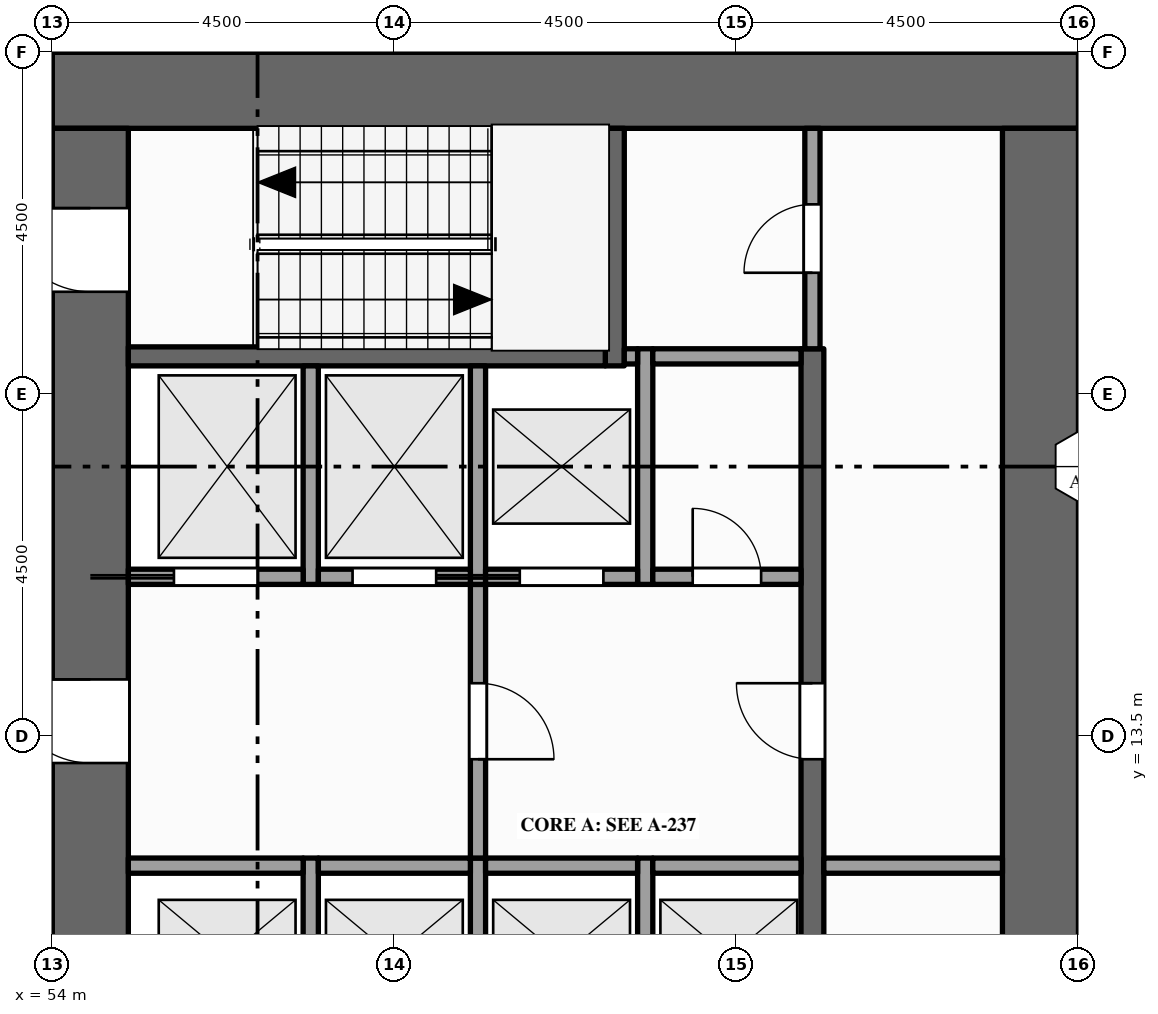
"""IFC4 building model, lengths in metres.
Left out: names, types, materials, properties, quantities, classifications, styles, units other than length and angle.
Written with IfcOpenShell. Run it as: python <this file> out.ifc"""

import sys

from ifc_helpers import new_model, si_unit, direction, frame, frame_2d, origin, place, context, subcontext, project, spatial, rectangle, extrude, element, fill, save


model = new_model("IFC4")
c1 = context("Model", 3, precision=1e-05, world=origin(), true_north=direction((0.0, 1.0)))
c2 = subcontext(c1, "Body", "Model", "MODEL_VIEW")
j1 = project(units=[si_unit("LENGTHUNIT", "METRE"), si_unit("PLANEANGLEUNIT", "RADIAN")], contexts=[c1])
p1 = place(None, origin())
s1 = spatial("IfcSite", under=j1, at=p1, CompositionType="ELEMENT")
p2 = place(p1, origin())
s2 = spatial("IfcBuilding", under=s1, at=p2, CompositionType="ELEMENT")
p3 = place(p2, frame((0.0, 0.0, 207.0)))
s3 = spatial("IfcBuildingStorey", under=s2, at=p3, CompositionType="ELEMENT", Elevation=207.0)
p4 = place(p3, frame((54.0, 22.0, -0.15), z_axis=(0.0, 0.0, 1.0), x_axis=(1.0, 0.0, 0.0)))
e1 = element("IfcWall", 1, at=p4, inside=s3, PredefinedType="SHEAR", context=c2, shape_type="SweptSolid", body=[
    extrude(rectangle(XDim=13.5, YDim=1.0, at=frame_2d((6.75, 0.0))), origin(), (0.0, 0.0, 1.0), 4.0),
])
p5 = place(p3, frame((54.5, 1.0, -0.15), z_axis=(0.0, 0.0, 1.0), x_axis=(0.0, 1.0, 0.0)))
e2 = element("IfcWall", 2, at=p5, inside=s3, PredefinedType="SHEAR", context=c2, shape_type="SweptSolid", body=[
    extrude(rectangle(XDim=20.5, YDim=1.0, at=frame_2d((10.25, 0.0))), origin(), (0.0, 0.0, 1.0), 4.0),
])
p6 = place(p5, frame((6.1, 0.0, 0.15)))
e3 = element("IfcOpeningElement", 3, at=p6, cuts=e2, PredefinedType="OPENING", context=c2, shape_type="SweptSolid", body=[
    extrude(rectangle(XDim=1.8, YDim=2.1, at=frame_2d((0.9, 1.05))), frame((0.0, 0.51, 0.0), z_axis=(0.0, -1.0, 0.0), x_axis=(1.0, 0.0, 0.0)), (0.0, 0.0, 1.0), 1.02),
])
p7 = place(p5, frame((12.15, 0.0, 0.15)))
e4 = element("IfcOpeningElement", 4, at=p7, cuts=e2, PredefinedType="OPENING", context=c2, shape_type="SweptSolid", body=[
    extrude(rectangle(XDim=1.1, YDim=2.1, at=frame_2d((0.55, 1.05))), frame((0.0, 0.51, 0.0), z_axis=(0.0, -1.0, 0.0), x_axis=(1.0, 0.0, 0.0)), (0.0, 0.0, 1.0), 1.02),
])
p8 = place(p5, frame((1.15, 0.0, 0.15)))
e5 = element("IfcOpeningElement", 5, at=p8, cuts=e2, PredefinedType="OPENING", context=c2, shape_type="SweptSolid", body=[
    extrude(rectangle(XDim=1.1, YDim=2.1, at=frame_2d((0.55, 1.05))), frame((0.0, 0.51, 0.0), z_axis=(0.0, -1.0, 0.0), x_axis=(1.0, 0.0, 0.0)), (0.0, 0.0, 1.0), 1.02),
])
p9 = place(p5, frame((18.35, 0.0, 0.15)))
e6 = element("IfcOpeningElement", 6, at=p9, cuts=e2, PredefinedType="OPENING", context=c2, shape_type="SweptSolid", body=[
    extrude(rectangle(XDim=1.1, YDim=2.1, at=frame_2d((0.55, 1.05))), frame((0.0, 0.51, 0.0), z_axis=(0.0, -1.0, 0.0), x_axis=(1.0, 0.0, 0.0)), (0.0, 0.0, 1.0), 1.02),
])
p10 = place(p3, frame((67.0, 1.0, -0.15), z_axis=(0.0, 0.0, 1.0), x_axis=(0.0, 1.0, 0.0)))
e7 = element("IfcWall", 7, at=p10, inside=s3, PredefinedType="SHEAR", context=c2, shape_type="SweptSolid", body=[
    extrude(rectangle(XDim=20.5, YDim=1.0, at=frame_2d((10.25, 0.0))), origin(), (0.0, 0.0, 1.0), 4.0),
])
p11 = place(p3, frame((57.4, 9.3, 0.0), z_axis=(0.0, 0.0, 1.0), x_axis=(0.0, 1.0, 0.0)))
e8 = element("IfcWall", 8, at=p11, inside=s3, PredefinedType="SOLIDWALL", context=c2, shape_type="SweptSolid", body=[
    extrude(rectangle(XDim=2.6, YDim=0.2, at=frame_2d((1.3, 0.0))), origin(), (0.0, 0.0, 1.0), 3.85),
])
p12 = place(p3, frame((57.4, 15.5, 0.0), z_axis=(0.0, 0.0, 1.0), x_axis=(0.0, 1.0, 0.0)))
e9 = element("IfcWall", 9, at=p12, inside=s3, PredefinedType="SOLIDWALL", context=c2, shape_type="SweptSolid", body=[
    extrude(rectangle(XDim=2.875, YDim=0.2, at=frame_2d((1.438, 0.0))), origin(), (0.0, 0.0, 1.0), 3.85),
])
p13 = place(p3, frame((59.6, 9.3, 0.0), z_axis=(0.0, 0.0, 1.0), x_axis=(0.0, 1.0, 0.0)))
e10 = element("IfcWall", 10, at=p13, inside=s3, PredefinedType="SOLIDWALL", context=c2, shape_type="SweptSolid", body=[
    extrude(rectangle(XDim=2.6, YDim=0.2, at=frame_2d((1.3, 0.0))), origin(), (0.0, 0.0, 1.0), 3.85),
])
p14 = place(p3, frame((59.6, 11.9, 0.0), z_axis=(0.0, 0.0, 1.0), x_axis=(0.0, 1.0, 0.0)))
e11 = element("IfcWall", 11, at=p14, inside=s3, PredefinedType="PARTITIONING", context=c2, shape_type="SweptSolid", body=[
    extrude(rectangle(XDim=3.6, YDim=0.2, at=frame_2d((1.8, 0.0))), origin(), (0.0, 0.0, 1.0), 3.85),
])
p15 = place(p14, frame((1.3, 0.0, 0.0)))
e12 = element("IfcOpeningElement", 12, at=p15, cuts=e11, PredefinedType="OPENING", context=c2, shape_type="SweptSolid", body=[
    extrude(rectangle(XDim=1.0, YDim=2.1, at=frame_2d((0.5, 1.05))), frame((0.0, 0.11, 0.0), z_axis=(0.0, -1.0, 0.0), x_axis=(1.0, 0.0, 0.0)), (0.0, 0.0, 1.0), 0.22),
])
p16 = place(p3, frame((59.6, 15.5, 0.0), z_axis=(0.0, 0.0, 1.0), x_axis=(0.0, 1.0, 0.0)))
e13 = element("IfcWall", 13, at=p16, inside=s3, PredefinedType="SOLIDWALL", context=c2, shape_type="SweptSolid", body=[
    extrude(rectangle(XDim=2.875, YDim=0.2, at=frame_2d((1.438, 0.0))), origin(), (0.0, 0.0, 1.0), 3.85),
])
p17 = place(p3, frame((61.4, 18.375, 0.0), z_axis=(0.0, 0.0, 1.0), x_axis=(0.0, 1.0, 0.0)))
e14 = element("IfcWall", 14, at=p17, inside=s3, PredefinedType="SHEAR", context=c2, shape_type="SweptSolid", body=[
    extrude(rectangle(XDim=3.125, YDim=0.25, at=frame_2d((1.562, 0.0))), origin(), (0.0, 0.0, 1.0), 3.85),
])
p18 = place(p3, frame((61.8, 9.3, 0.0), z_axis=(0.0, 0.0, 1.0), x_axis=(0.0, 1.0, 0.0)))
e15 = element("IfcWall", 15, at=p18, inside=s3, PredefinedType="SOLIDWALL", context=c2, shape_type="SweptSolid", body=[
    extrude(rectangle(XDim=2.6, YDim=0.2, at=frame_2d((1.3, 0.0))), origin(), (0.0, 0.0, 1.0), 3.85),
])
p19 = place(p3, frame((61.8, 15.5, 0.0), z_axis=(0.0, 0.0, 1.0), x_axis=(0.0, 1.0, 0.0)))
e16 = element("IfcWall", 16, at=p19, inside=s3, PredefinedType="SOLIDWALL", context=c2, shape_type="SweptSolid", body=[
    extrude(rectangle(XDim=3.1, YDim=0.2, at=frame_2d((1.55, 0.0))), origin(), (0.0, 0.0, 1.0), 3.85),
])
p20 = place(p3, frame((64.0, 4.1, 0.0), z_axis=(0.0, 0.0, 1.0), x_axis=(0.0, 1.0, 0.0)))
e17 = element("IfcWall", 17, at=p20, inside=s3, PredefinedType="SHEAR", context=c2, shape_type="SweptSolid", body=[
    extrude(rectangle(XDim=14.5, YDim=0.3, at=frame_2d((7.25, 0.0))), origin(), (0.0, 0.0, 1.0), 3.85),
])
p21 = place(p20, frame((3.4, 0.0, 0.0)))
e18 = element("IfcOpeningElement", 18, at=p21, cuts=e17, PredefinedType="OPENING", context=c2, shape_type="SweptSolid", body=[
    extrude(rectangle(XDim=1.0, YDim=2.1, at=frame_2d((0.5, 1.05))), frame((0.0, 0.16, 0.0), z_axis=(0.0, -1.0, 0.0), x_axis=(1.0, 0.0, 0.0)), (0.0, 0.0, 1.0), 0.32),
])
p22 = place(p20, frame((9.1, 0.0, 0.0)))
e19 = element("IfcOpeningElement", 19, at=p22, cuts=e17, PredefinedType="OPENING", context=c2, shape_type="SweptSolid", body=[
    extrude(rectangle(XDim=1.0, YDim=2.1, at=frame_2d((0.5, 1.05))), frame((0.0, 0.16, 0.0), z_axis=(0.0, -1.0, 0.0), x_axis=(1.0, 0.0, 0.0)), (0.0, 0.0, 1.0), 0.32),
])
p23 = place(p3, frame((64.0, 18.6, 0.0), z_axis=(0.0, 0.0, 1.0), x_axis=(0.0, 1.0, 0.0)))
e20 = element("IfcWall", 20, at=p23, inside=s3, PredefinedType="PARTITIONING", context=c2, shape_type="SweptSolid", body=[
    extrude(rectangle(XDim=2.9, YDim=0.2, at=frame_2d((1.45, 0.0))), origin(), (0.0, 0.0, 1.0), 3.85),
])
p24 = place(p23, frame((1.0, 0.0, 0.0)))
e21 = element("IfcOpeningElement", 21, at=p24, cuts=e20, PredefinedType="OPENING", context=c2, shape_type="SweptSolid", body=[
    extrude(rectangle(XDim=0.9, YDim=2.1, at=frame_2d((0.45, 1.05))), frame((0.0, 0.11, 0.0), z_axis=(0.0, -1.0, 0.0), x_axis=(1.0, 0.0, 0.0)), (0.0, 0.0, 1.0), 0.22),
])
p25 = place(p3, frame((55.0, 11.8, 0.0), z_axis=(0.0, 0.0, 1.0), x_axis=(1.0, 0.0, 0.0)))
e22 = element("IfcWall", 22, at=p25, inside=s3, PredefinedType="SOLIDWALL", context=c2, shape_type="SweptSolid", body=[
    extrude(rectangle(XDim=2.3, YDim=0.2, at=frame_2d((1.15, 0.0))), origin(), (0.0, 0.0, 1.0), 3.85),
])
for number, where, z_axis, x_axis in (
    (23, (57.5, 11.8, 0.0), (0.0, 0.0, 1.0), (1.0, 0.0, 0.0)),
    (24, (59.7, 11.8, 0.0), (0.0, 0.0, 1.0), (1.0, 0.0, 0.0)),
):
    element("IfcWall", number, at=place(p3, frame(where, z_axis=z_axis, x_axis=x_axis)), inside=s3, PredefinedType="SOLIDWALL", context=c2, shape_type="SweptSolid", body=[
        extrude(rectangle(XDim=2.0, YDim=0.2, at=frame_2d((1.0, 0.0))), origin(), (0.0, 0.0, 1.0), 3.85),
    ])
p26 = place(p3, frame((61.9, 11.8, 0.0), z_axis=(0.0, 0.0, 1.0), x_axis=(1.0, 0.0, 0.0)))
e25 = element("IfcWall", 25, at=p26, inside=s3, PredefinedType="SOLIDWALL", context=c2, shape_type="SweptSolid", body=[
    extrude(rectangle(XDim=1.95, YDim=0.2, at=frame_2d((0.975, 0.0))), origin(), (0.0, 0.0, 1.0), 3.85),
])
p27 = place(p3, frame((64.15, 11.8, 0.0), z_axis=(0.0, 0.0, 1.0), x_axis=(1.0, 0.0, 0.0)))
e26 = element("IfcWall", 26, at=p27, inside=s3, PredefinedType="PARTITIONING", context=c2, shape_type="SweptSolid", body=[
    extrude(rectangle(XDim=2.35, YDim=0.2, at=frame_2d((1.175, 0.0))), origin(), (0.0, 0.0, 1.0), 3.85),
])
p28 = place(p3, frame((55.0, 15.6, 0.0), z_axis=(0.0, 0.0, 1.0), x_axis=(1.0, 0.0, 0.0)))
e27 = element("IfcWall", 27, at=p28, inside=s3, PredefinedType="SOLIDWALL", context=c2, shape_type="SweptSolid", body=[
    extrude(rectangle(XDim=2.3, YDim=0.2, at=frame_2d((1.15, 0.0))), origin(), (0.0, 0.0, 1.0), 3.85),
])
p29 = place(p28, frame((0.6, 0.0, 0.012)))
e28 = element("IfcOpeningElement", 28, at=p29, cuts=e27, PredefinedType="OPENING", context=c2, shape_type="SweptSolid", body=[
    extrude(rectangle(XDim=1.1, YDim=2.1, at=frame_2d((0.55, 1.05))), frame((0.0, 0.11, 0.0), z_axis=(0.0, -1.0, 0.0), x_axis=(1.0, 0.0, 0.0)), (0.0, 0.0, 1.0), 0.22),
])
p30 = place(p3, frame((57.5, 15.6, 0.0), z_axis=(0.0, 0.0, 1.0), x_axis=(1.0, 0.0, 0.0)))
e29 = element("IfcWall", 29, at=p30, inside=s3, PredefinedType="SOLIDWALL", context=c2, shape_type="SweptSolid", body=[
    extrude(rectangle(XDim=2.0, YDim=0.2, at=frame_2d((1.0, 0.0))), origin(), (0.0, 0.0, 1.0), 3.85),
])
p31 = place(p30, frame((0.45, 0.0, 0.012)))
e30 = element("IfcOpeningElement", 30, at=p31, cuts=e29, PredefinedType="OPENING", context=c2, shape_type="SweptSolid", body=[
    extrude(rectangle(XDim=1.1, YDim=2.1, at=frame_2d((0.55, 1.05))), frame((0.0, 0.11, 0.0), z_axis=(0.0, -1.0, 0.0), x_axis=(1.0, 0.0, 0.0)), (0.0, 0.0, 1.0), 0.22),
])
p32 = place(p3, frame((59.7, 15.6, 0.0), z_axis=(0.0, 0.0, 1.0), x_axis=(1.0, 0.0, 0.0)))
e31 = element("IfcWall", 31, at=p32, inside=s3, PredefinedType="SOLIDWALL", context=c2, shape_type="SweptSolid", body=[
    extrude(rectangle(XDim=2.0, YDim=0.2, at=frame_2d((1.0, 0.0))), origin(), (0.0, 0.0, 1.0), 3.85),
])
p33 = place(p32, frame((0.45, 0.0, 0.012)))
e32 = element("IfcOpeningElement", 32, at=p33, cuts=e31, PredefinedType="OPENING", context=c2, shape_type="SweptSolid", body=[
    extrude(rectangle(XDim=1.1, YDim=2.1, at=frame_2d((0.55, 1.05))), frame((0.0, 0.11, 0.0), z_axis=(0.0, -1.0, 0.0), x_axis=(1.0, 0.0, 0.0)), (0.0, 0.0, 1.0), 0.22),
])
p34 = place(p3, frame((61.9, 15.6, 0.0), z_axis=(0.0, 0.0, 1.0), x_axis=(1.0, 0.0, 0.0)))
e33 = element("IfcWall", 33, at=p34, inside=s3, PredefinedType="PARTITIONING", context=c2, shape_type="SweptSolid", body=[
    extrude(rectangle(XDim=1.95, YDim=0.2, at=frame_2d((0.975, 0.0))), origin(), (0.0, 0.0, 1.0), 3.85),
])
p35 = place(p34, frame((0.525, 0.0, 0.0)))
e34 = element("IfcOpeningElement", 34, at=p35, cuts=e33, PredefinedType="OPENING", context=c2, shape_type="SweptSolid", body=[
    extrude(rectangle(XDim=0.9, YDim=2.1, at=frame_2d((0.45, 1.05))), frame((0.0, 0.11, 0.0), z_axis=(0.0, -1.0, 0.0), x_axis=(1.0, 0.0, 0.0)), (0.0, 0.0, 1.0), 0.22),
])
p36 = place(p3, frame((55.0, 18.5, 0.0), z_axis=(0.0, 0.0, 1.0), x_axis=(1.0, 0.0, 0.0)))
e35 = element("IfcWall", 35, at=p36, inside=s3, PredefinedType="SHEAR", context=c2, shape_type="SweptSolid", body=[
    extrude(rectangle(XDim=6.275, YDim=0.25, at=frame_2d((3.137, 0.0))), origin(), (0.0, 0.0, 1.0), 3.85),
])
p37 = place(p3, frame((61.525, 18.5, 0.0), z_axis=(0.0, 0.0, 1.0), x_axis=(1.0, 0.0, 0.0)))
e36 = element("IfcWall", 36, at=p37, inside=s3, PredefinedType="SOLIDWALL", context=c2, shape_type="SweptSolid", body=[
    extrude(rectangle(XDim=0.175, YDim=0.2, at=frame_2d((0.087, 0.0))), origin(), (0.0, 0.0, 1.0), 3.85),
])
p38 = place(p3, frame((61.9, 18.5, 0.0), z_axis=(0.0, 0.0, 1.0), x_axis=(1.0, 0.0, 0.0)))
e37 = element("IfcWall", 37, at=p38, inside=s3, PredefinedType="PARTITIONING", context=c2, shape_type="SweptSolid", body=[
    extrude(rectangle(XDim=1.95, YDim=0.2, at=frame_2d((0.975, 0.0))), origin(), (0.0, 0.0, 1.0), 3.85),
])
p39 = place(p29, origin())
e38 = element("IfcDoor", 38, at=p39, inside=s3, OperationType="SLIDING_TO_LEFT", PredefinedType="DOOR", context=c2, shape_type="SweptSolid", body=[
    extrude(rectangle(XDim=1.1, YDim=2.1, at=frame_2d((0.55, 1.05))), frame((0.0, 0.025, 0.0), z_axis=(0.0, -1.0, 0.0), x_axis=(1.0, 0.0, 0.0)), (0.0, 0.0, 1.0), 0.05),
])
fill(e28, e38)
p40 = place(p31, origin())
e39 = element("IfcDoor", 39, at=p40, inside=s3, OperationType="SLIDING_TO_RIGHT", PredefinedType="DOOR", context=c2, shape_type="SweptSolid", body=[
    extrude(rectangle(XDim=1.1, YDim=2.1, at=frame_2d((0.55, 1.05))), frame((0.0, 0.025, 0.0), z_axis=(0.0, -1.0, 0.0), x_axis=(1.0, 0.0, 0.0)), (0.0, 0.0, 1.0), 0.05),
])
fill(e30, e39)
p41 = place(p33, origin())
e40 = element("IfcDoor", 40, at=p41, inside=s3, OperationType="SLIDING_TO_LEFT", PredefinedType="DOOR", context=c2, shape_type="SweptSolid", body=[
    extrude(rectangle(XDim=1.1, YDim=2.1, at=frame_2d((0.55, 1.05))), frame((0.0, 0.025, 0.0), z_axis=(0.0, -1.0, 0.0), x_axis=(1.0, 0.0, 0.0)), (0.0, 0.0, 1.0), 0.05),
])
fill(e32, e40)
p42 = place(p7, origin())
e41 = element("IfcDoor", 41, at=p42, inside=s3, OperationType="SINGLE_SWING_RIGHT", PredefinedType="DOOR", context=c2, shape_type="SweptSolid", body=[
    extrude(rectangle(XDim=1.1, YDim=2.1, at=frame_2d((0.55, 1.05))), frame((0.0, 0.025, 0.0), z_axis=(0.0, -1.0, 0.0), x_axis=(1.0, 0.0, 0.0)), (0.0, 0.0, 1.0), 0.05),
])
fill(e4, e41)
p43 = place(p15, origin())
e42 = element("IfcDoor", 42, at=p43, inside=s3, OperationType="SINGLE_SWING_LEFT", PredefinedType="DOOR", context=c2, shape_type="SweptSolid", body=[
    extrude(rectangle(XDim=1.0, YDim=2.1, at=frame_2d((0.5, 1.05))), frame((0.0, 0.025, 0.0), z_axis=(0.0, -1.0, 0.0), x_axis=(1.0, 0.0, 0.0)), (0.0, 0.0, 1.0), 0.05),
])
fill(e12, e42)
p44 = place(p22, origin())
e43 = element("IfcDoor", 43, at=p44, inside=s3, OperationType="SINGLE_SWING_RIGHT", PredefinedType="DOOR", context=c2, shape_type="SweptSolid", body=[
    extrude(rectangle(XDim=1.0, YDim=2.1, at=frame_2d((0.5, 1.05))), frame((0.0, 0.025, 0.0), z_axis=(0.0, -1.0, 0.0), x_axis=(1.0, 0.0, 0.0)), (0.0, 0.0, 1.0), 0.05),
])
fill(e19, e43)
p45 = place(p9, origin())
e44 = element("IfcDoor", 44, at=p45, inside=s3, OperationType="SINGLE_SWING_RIGHT", PredefinedType="DOOR", context=c2, shape_type="SweptSolid", body=[
    extrude(rectangle(XDim=1.1, YDim=2.1, at=frame_2d((0.55, 1.05))), frame((0.0, 0.025, 0.0), z_axis=(0.0, -1.0, 0.0), x_axis=(1.0, 0.0, 0.0)), (0.0, 0.0, 1.0), 0.05),
])
fill(e6, e44)
p46 = place(p24, origin())
e45 = element("IfcDoor", 45, at=p46, inside=s3, OperationType="SINGLE_SWING_LEFT", PredefinedType="DOOR", context=c2, shape_type="SweptSolid", body=[
    extrude(rectangle(XDim=0.9, YDim=2.1, at=frame_2d((0.45, 1.05))), frame((0.0, 0.025, 0.0), z_axis=(0.0, -1.0, 0.0), x_axis=(1.0, 0.0, 0.0)), (0.0, 0.0, 1.0), 0.05),
])
fill(e21, e45)
p47 = place(p35, origin())
e46 = element("IfcDoor", 46, at=p47, inside=s3, OperationType="SINGLE_SWING_LEFT", PredefinedType="DOOR", context=c2, shape_type="SweptSolid", body=[
    extrude(rectangle(XDim=0.9, YDim=2.1, at=frame_2d((0.45, 1.05))), frame((0.0, 0.025, 0.0), z_axis=(0.0, -1.0, 0.0), x_axis=(1.0, 0.0, 0.0)), (0.0, 0.0, 1.0), 0.05),
])
fill(e34, e46)
save(model, sys.argv[1])
